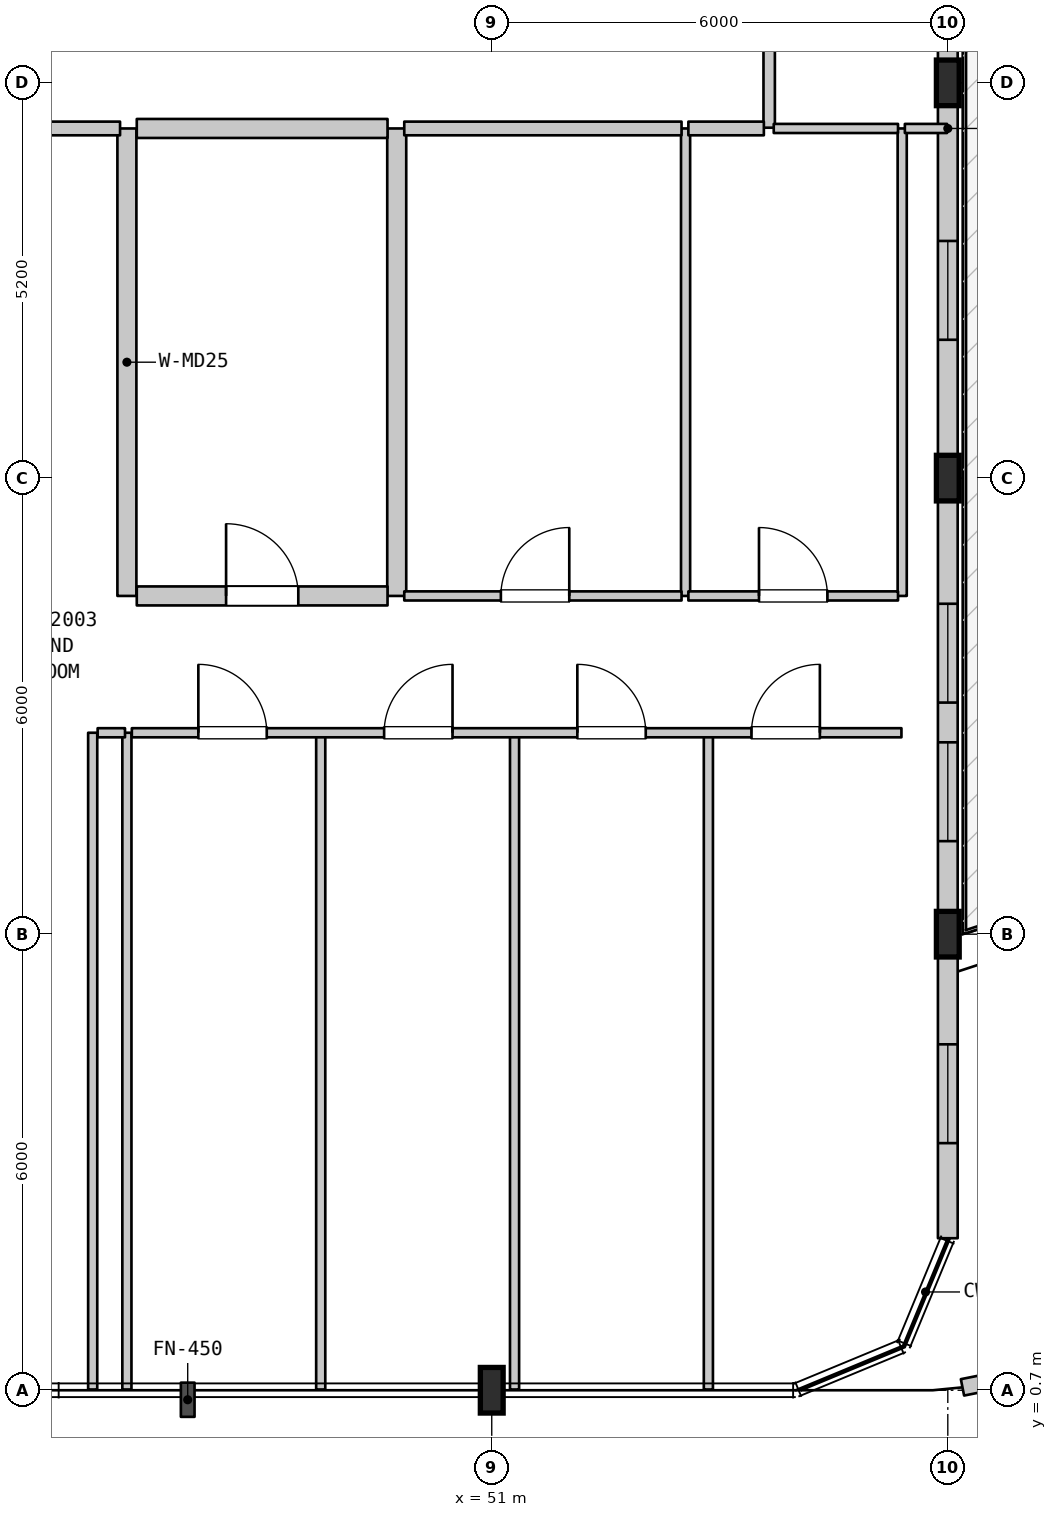
"""IFC4 building model, lengths in metres.
Left out: names, types, materials, properties, quantities, classifications, styles, units other than length and angle.
Written with IfcOpenShell. Run it as: python <this file> out.ifc"""

import sys

from ifc_helpers import new_model, si_unit, direction, frame, frame_2d, origin, origin_2d, place, context, subcontext, project, spatial, rectangle, i_section, extrude, element, fill, save


model = new_model("IFC4")
c1 = context("Model", 3, precision=1e-05, world=origin(), true_north=direction((0.0, 1.0)))
c2 = subcontext(c1, "Body", "Model", "MODEL_VIEW")
j1 = project(units=[si_unit("LENGTHUNIT", "METRE"), si_unit("PLANEANGLEUNIT", "RADIAN")], contexts=[c1])
p1 = place(None, origin())
s1 = spatial("IfcSite", under=j1, at=p1, CompositionType="ELEMENT")
p2 = place(p1, origin())
s2 = spatial("IfcBuilding", under=s1, at=p2, CompositionType="ELEMENT")
p3 = place(p2, frame((0.0, 0.0, 86.4)))
s3 = spatial("IfcBuildingStorey", under=s2, at=p3, CompositionType="ELEMENT", Elevation=86.4)
for number, where, z_axis, x_axis in (
    (1, (51.0, 0.7, 0.0), (0.0, 0.0, 1.0), (1.0, 0.0, 0.0)),
    (2, (57.0, 6.7, 0.0), (0.0, 0.0, 1.0), (1.0, 0.0, 0.0)),
    (3, (57.0, 12.7, 0.0), (0.0, 0.0, 1.0), (1.0, 0.0, 0.0)),
    (4, (57.0, 17.9, 0.0), (0.0, 0.0, 1.0), (1.0, 0.0, 0.0)),
):
    element("IfcColumn", number, at=place(p3, frame(where, z_axis=z_axis, x_axis=x_axis)), inside=s3, PredefinedType="COLUMN", context=c2, shape_type="SweptSolid", body=[
        extrude(i_section(OverallWidth=0.3, OverallDepth=0.6, WebThickness=0.015, FlangeThickness=0.03, FilletRadius=0.027, at=origin_2d()), origin(), (0.0, 0.0, 1.0), 4.5),
    ])
p4 = place(p3, frame((57.0, 27.9, 0.0), z_axis=(0.0, 0.0, 1.0), x_axis=(0.0, -1.0, 0.0)))
e5 = element("IfcWall", 5, at=p4, inside=s3, PredefinedType="STANDARD", context=c2, shape_type="SweptSolid", body=[
    extrude(rectangle(XDim=21.2, YDim=0.26, at=frame_2d((10.6, 0.0))), origin(), (0.0, 0.0, 1.0), 3.735),
])
p5 = place(p4, frame((1.511, 0.0, 0.85)))
e6 = element("IfcOpeningElement", 6, at=p5, cuts=e5, PredefinedType="OPENING", context=c2, shape_type="SweptSolid", body=[
    extrude(rectangle(XDim=1.3, YDim=1.9, at=frame_2d((0.65, 0.95))), frame((0.0, 0.14, 0.0), z_axis=(0.0, -1.0, 0.0), x_axis=(1.0, 0.0, 0.0)), (0.0, 0.0, 1.0), 0.28),
])
p6 = place(p4, frame((7.707, 0.0, 0.85)))
e7 = element("IfcOpeningElement", 7, at=p6, cuts=e5, PredefinedType="OPENING", context=c2, shape_type="SweptSolid", body=[
    extrude(rectangle(XDim=1.3, YDim=1.9, at=frame_2d((0.65, 0.95))), frame((0.0, 0.14, 0.0), z_axis=(0.0, -1.0, 0.0), x_axis=(1.0, 0.0, 0.0)), (0.0, 0.0, 1.0), 0.28),
])
p7 = place(p4, frame((12.08, 0.0, 0.85)))
e8 = element("IfcOpeningElement", 8, at=p7, cuts=e5, PredefinedType="OPENING", context=c2, shape_type="SweptSolid", body=[
    extrude(rectangle(XDim=1.3, YDim=1.9, at=frame_2d((0.65, 0.95))), frame((0.0, 0.14, 0.0), z_axis=(0.0, -1.0, 0.0), x_axis=(1.0, 0.0, 0.0)), (0.0, 0.0, 1.0), 0.28),
])
p8 = place(p4, frame((16.853, 0.0, 0.85)))
e9 = element("IfcOpeningElement", 9, at=p8, cuts=e5, PredefinedType="OPENING", context=c2, shape_type="SweptSolid", body=[
    extrude(rectangle(XDim=1.3, YDim=1.9, at=frame_2d((0.65, 0.95))), frame((0.0, 0.14, 0.0), z_axis=(0.0, -1.0, 0.0), x_axis=(1.0, 0.0, 0.0)), (0.0, 0.0, 1.0), 0.28),
])
p9 = place(p4, frame((18.676, 0.0, 0.85)))
e10 = element("IfcOpeningElement", 10, at=p9, cuts=e5, PredefinedType="OPENING", context=c2, shape_type="SweptSolid", body=[
    extrude(rectangle(XDim=1.3, YDim=1.9, at=frame_2d((0.65, 0.95))), frame((0.0, 0.14, 0.0), z_axis=(0.0, -1.0, 0.0), x_axis=(1.0, 0.0, 0.0)), (0.0, 0.0, 1.0), 0.28),
])
p10 = place(p3, frame((61.585, 1.612, 0.0), z_axis=(0.0, 0.0, 1.0), x_axis=(-0.980766859102, -0.19518290931, 0.0)))
e11 = element("IfcWall", 11, at=p10, inside=s3, PredefinedType="PARAPET", context=c2, shape_type="SweptSolid", body=[
    extrude(rectangle(XDim=4.478, YDim=0.22, at=frame_2d((2.239, 0.0))), origin(), (0.0, 0.0, 1.0), 0.55),
])
for number, where, z_axis, x_axis in (
    (12, (45.75, 0.71, 0.0), (0.0, 0.0, 1.0), (0.0, 1.0, 0.0)),
    (13, (46.2, 0.71, 0.0), (0.0, 0.0, 1.0), (0.0, 1.0, 0.0)),
):
    element("IfcWall", number, at=place(p3, frame(where, z_axis=z_axis, x_axis=x_axis)), inside=s3, PredefinedType="PARTITIONING", context=c2, shape_type="SweptSolid", body=[
        extrude(rectangle(XDim=8.64, YDim=0.12, at=frame_2d((4.32, 0.0))), origin(), (0.0, 0.0, 1.0), 4.185),
    ])
p11 = place(p3, frame((46.2, 11.15, 0.0), z_axis=(0.0, 0.0, 1.0), x_axis=(0.0, 1.0, 0.0)))
e14 = element("IfcWall", 14, at=p11, inside=s3, PredefinedType="STANDARD", context=c2, shape_type="SweptSolid", body=[
    extrude(rectangle(XDim=6.15, YDim=0.25, at=frame_2d((3.075, 0.0))), origin(), (0.0, 0.0, 1.0), 4.185),
])
p12 = place(p3, frame((48.75, 0.71, 0.0), z_axis=(0.0, 0.0, 1.0), x_axis=(0.0, 1.0, 0.0)))
e15 = element("IfcWall", 15, at=p12, inside=s3, PredefinedType="PARTITIONING", context=c2, shape_type="SweptSolid", body=[
    extrude(rectangle(XDim=8.64, YDim=0.12, at=frame_2d((4.32, 0.0))), origin(), (0.0, 0.0, 1.0), 4.185),
])
p13 = place(p3, frame((49.75, 11.15, 0.0), z_axis=(0.0, 0.0, 1.0), x_axis=(0.0, 1.0, 0.0)))
e16 = element("IfcWall", 16, at=p13, inside=s3, PredefinedType="STANDARD", context=c2, shape_type="SweptSolid", body=[
    extrude(rectangle(XDim=6.15, YDim=0.25, at=frame_2d((3.075, 0.0))), origin(), (0.0, 0.0, 1.0), 4.185),
])
p14 = place(p3, frame((51.3, 0.71, 0.0), z_axis=(0.0, 0.0, 1.0), x_axis=(0.0, 1.0, 0.0)))
e17 = element("IfcWall", 17, at=p14, inside=s3, PredefinedType="PARTITIONING", context=c2, shape_type="SweptSolid", body=[
    extrude(rectangle(XDim=8.64, YDim=0.12, at=frame_2d((4.32, 0.0))), origin(), (0.0, 0.0, 1.0), 4.185),
])
p15 = place(p3, frame((53.55, 11.15, 0.0), z_axis=(0.0, 0.0, 1.0), x_axis=(0.0, 1.0, 0.0)))
e18 = element("IfcWall", 18, at=p15, inside=s3, PredefinedType="PARTITIONING", context=c2, shape_type="SweptSolid", body=[
    extrude(rectangle(XDim=6.15, YDim=0.12, at=frame_2d((3.075, 0.0))), origin(), (0.0, 0.0, 1.0), 4.185),
])
p16 = place(p3, frame((53.85, 0.71, 0.0), z_axis=(0.0, 0.0, 1.0), x_axis=(0.0, 1.0, 0.0)))
e19 = element("IfcWall", 19, at=p16, inside=s3, PredefinedType="PARTITIONING", context=c2, shape_type="SweptSolid", body=[
    extrude(rectangle(XDim=8.64, YDim=0.12, at=frame_2d((4.32, 0.0))), origin(), (0.0, 0.0, 1.0), 4.185),
])
p17 = place(p3, frame((54.65, 17.31, 0.0), z_axis=(0.0, 0.0, 1.0), x_axis=(0.0, 1.0, 0.0)))
e20 = element("IfcWall", 20, at=p17, inside=s3, PredefinedType="STANDARD", context=c2, shape_type="SweptSolid", body=[
    extrude(rectangle(XDim=2.19, YDim=0.15, at=frame_2d((1.095, 0.0))), origin(), (0.0, 0.0, 1.0), 4.185),
])
p18 = place(p3, frame((56.4, 11.15, 0.0), z_axis=(0.0, 0.0, 1.0), x_axis=(0.0, 1.0, 0.0)))
e21 = element("IfcWall", 21, at=p18, inside=s3, PredefinedType="PARTITIONING", context=c2, shape_type="SweptSolid", body=[
    extrude(rectangle(XDim=6.15, YDim=0.12, at=frame_2d((3.075, 0.0))), origin(), (0.0, 0.0, 1.0), 4.185),
])
p19 = place(p3, frame((45.815, 9.35, 0.0), z_axis=(0.0, 0.0, 1.0), x_axis=(1.0, 0.0, 0.0)))
e22 = element("IfcWall", 22, at=p19, inside=s3, PredefinedType="PARTITIONING", context=c2, shape_type="SweptSolid", body=[
    extrude(rectangle(XDim=0.36, YDim=0.12, at=frame_2d((0.18, 0.0))), origin(), (0.0, 0.0, 1.0), 4.185),
])
p20 = place(p3, frame((46.265, 9.35, 0.0), z_axis=(0.0, 0.0, 1.0), x_axis=(1.0, 0.0, 0.0)))
e23 = element("IfcWall", 23, at=p20, inside=s3, PredefinedType="PARTITIONING", context=c2, shape_type="SweptSolid", body=[
    extrude(rectangle(XDim=10.125, YDim=0.12, at=frame_2d((5.062, 0.0))), origin(), (0.0, 0.0, 1.0), 4.185),
])
p21 = place(p20, frame((0.875, 0.0, 0.0)))
e24 = element("IfcOpeningElement", 24, at=p21, cuts=e23, PredefinedType="OPENING", context=c2, shape_type="SweptSolid", body=[
    extrude(rectangle(XDim=0.9, YDim=2.15, at=frame_2d((0.45, 1.075))), frame((0.0, 0.07, 0.0), z_axis=(0.0, -1.0, 0.0), x_axis=(1.0, 0.0, 0.0)), (0.0, 0.0, 1.0), 0.14),
])
p22 = place(p20, frame((3.319, 0.0, 0.0)))
e25 = element("IfcOpeningElement", 25, at=p22, cuts=e23, PredefinedType="OPENING", context=c2, shape_type="SweptSolid", body=[
    extrude(rectangle(XDim=0.9, YDim=2.15, at=frame_2d((0.45, 1.075))), frame((0.0, 0.07, 0.0), z_axis=(0.0, -1.0, 0.0), x_axis=(1.0, 0.0, 0.0)), (0.0, 0.0, 1.0), 0.14),
])
p23 = place(p20, frame((5.861, 0.0, 0.0)))
e26 = element("IfcOpeningElement", 26, at=p23, cuts=e23, PredefinedType="OPENING", context=c2, shape_type="SweptSolid", body=[
    extrude(rectangle(XDim=0.9, YDim=2.15, at=frame_2d((0.45, 1.075))), frame((0.0, 0.07, 0.0), z_axis=(0.0, -1.0, 0.0), x_axis=(1.0, 0.0, 0.0)), (0.0, 0.0, 1.0), 0.14),
])
p24 = place(p20, frame((8.152, 0.0, 0.0)))
e27 = element("IfcOpeningElement", 27, at=p24, cuts=e23, PredefinedType="OPENING", context=c2, shape_type="SweptSolid", body=[
    extrude(rectangle(XDim=0.9, YDim=2.15, at=frame_2d((0.45, 1.075))), frame((0.0, 0.07, 0.0), z_axis=(0.0, -1.0, 0.0), x_axis=(1.0, 0.0, 0.0)), (0.0, 0.0, 1.0), 0.14),
])
p25 = place(p3, frame((46.33, 11.15, 0.0), z_axis=(0.0, 0.0, 1.0), x_axis=(1.0, 0.0, 0.0)))
e28 = element("IfcWall", 28, at=p25, inside=s3, PredefinedType="STANDARD", context=c2, shape_type="SweptSolid", body=[
    extrude(rectangle(XDim=3.299, YDim=0.25, at=frame_2d((1.649, 0.0))), origin(), (0.0, 0.0, 1.0), 4.185),
])
p26 = place(p25, frame((1.175, 0.0, 0.0)))
e29 = element("IfcOpeningElement", 29, at=p26, cuts=e28, PredefinedType="OPENING", context=c2, shape_type="SweptSolid", body=[
    extrude(rectangle(XDim=0.95, YDim=2.15, at=frame_2d((0.475, 1.075))), frame((0.0, 0.135, 0.0), z_axis=(0.0, -1.0, 0.0), x_axis=(1.0, 0.0, 0.0)), (0.0, 0.0, 1.0), 0.27),
])
p27 = place(p3, frame((49.849, 11.15, 0.0), z_axis=(0.0, 0.0, 1.0), x_axis=(1.0, 0.0, 0.0)))
e30 = element("IfcWall", 30, at=p27, inside=s3, PredefinedType="PARTITIONING", context=c2, shape_type="SweptSolid", body=[
    extrude(rectangle(XDim=3.648, YDim=0.12, at=frame_2d((1.824, 0.0))), origin(), (0.0, 0.0, 1.0), 4.185),
])
p28 = place(p27, frame((1.271, 0.0, 0.0)))
e31 = element("IfcOpeningElement", 31, at=p28, cuts=e30, PredefinedType="OPENING", context=c2, shape_type="SweptSolid", body=[
    extrude(rectangle(XDim=0.9, YDim=2.15, at=frame_2d((0.45, 1.075))), frame((0.0, 0.07, 0.0), z_axis=(0.0, -1.0, 0.0), x_axis=(1.0, 0.0, 0.0)), (0.0, 0.0, 1.0), 0.14),
])
p29 = place(p3, frame((53.587, 11.15, 0.0), z_axis=(0.0, 0.0, 1.0), x_axis=(1.0, 0.0, 0.0)))
e32 = element("IfcWall", 32, at=p29, inside=s3, PredefinedType="PARTITIONING", context=c2, shape_type="SweptSolid", body=[
    extrude(rectangle(XDim=2.758, YDim=0.12, at=frame_2d((1.379, 0.0))), origin(), (0.0, 0.0, 1.0), 4.185),
])
p30 = place(p29, frame((0.929, 0.0, 0.0)))
e33 = element("IfcOpeningElement", 33, at=p30, cuts=e32, PredefinedType="OPENING", context=c2, shape_type="SweptSolid", body=[
    extrude(rectangle(XDim=0.9, YDim=2.1, at=frame_2d((0.45, 1.05))), frame((0.0, 0.07, 0.0), z_axis=(0.0, -1.0, 0.0), x_axis=(1.0, 0.0, 0.0)), (0.0, 0.0, 1.0), 0.14),
])
p31 = place(p3, frame((40.565, 17.3, 0.0), z_axis=(0.0, 0.0, 1.0), x_axis=(1.0, 0.0, 0.0)))
e34 = element("IfcWall", 34, at=p31, inside=s3, PredefinedType="STANDARD", context=c2, shape_type="SweptSolid", body=[
    extrude(rectangle(XDim=5.545, YDim=0.18, at=frame_2d((2.772, 0.0))), origin(), (0.0, 0.0, 1.0), 4.185),
])
p32 = place(p31, frame((2.435, 0.0, 0.0)))
e35 = element("IfcOpeningElement", 35, at=p32, cuts=e34, PredefinedType="OPENING", context=c2, shape_type="SweptSolid", body=[
    extrude(rectangle(XDim=1.0, YDim=2.15, at=frame_2d((0.5, 1.075))), frame((0.0, 0.1, 0.0), z_axis=(0.0, -1.0, 0.0), x_axis=(1.0, 0.0, 0.0)), (0.0, 0.0, 1.0), 0.2),
])
p33 = place(p3, frame((46.33, 17.3, 0.0), z_axis=(0.0, 0.0, 1.0), x_axis=(1.0, 0.0, 0.0)))
e36 = element("IfcWall", 36, at=p33, inside=s3, PredefinedType="STANDARD", context=c2, shape_type="SweptSolid", body=[
    extrude(rectangle(XDim=3.299, YDim=0.25, at=frame_2d((1.649, 0.0))), origin(), (0.0, 0.0, 1.0), 4.185),
])
p34 = place(p3, frame((49.849, 17.3, 0.0), z_axis=(0.0, 0.0, 1.0), x_axis=(1.0, 0.0, 0.0)))
e37 = element("IfcWall", 37, at=p34, inside=s3, PredefinedType="STANDARD", context=c2, shape_type="SweptSolid", body=[
    extrude(rectangle(XDim=3.648, YDim=0.18, at=frame_2d((1.824, 0.0))), origin(), (0.0, 0.0, 1.0), 4.185),
])
p35 = place(p3, frame((53.587, 17.3, 0.0), z_axis=(0.0, 0.0, 1.0), x_axis=(1.0, 0.0, 0.0)))
e38 = element("IfcWall", 38, at=p35, inside=s3, PredefinedType="STANDARD", context=c2, shape_type="SweptSolid", body=[
    extrude(rectangle(XDim=0.993, YDim=0.18, at=frame_2d((0.497, 0.0))), origin(), (0.0, 0.0, 1.0), 4.185),
])
p36 = place(p3, frame((54.71, 17.3, 0.0), z_axis=(0.0, 0.0, 1.0), x_axis=(1.0, 0.0, 0.0)))
e39 = element("IfcWall", 39, at=p36, inside=s3, PredefinedType="PARTITIONING", context=c2, shape_type="SweptSolid", body=[
    extrude(rectangle(XDim=1.635, YDim=0.12, at=frame_2d((0.817, 0.0))), origin(), (0.0, 0.0, 1.0), 4.185),
])
p37 = place(p3, frame((56.435, 17.3, 0.0), z_axis=(0.0, 0.0, 1.0), x_axis=(1.0, 0.0, 0.0)))
e40 = element("IfcWall", 40, at=p37, inside=s3, PredefinedType="PARTITIONING", context=c2, shape_type="SweptSolid", body=[
    extrude(rectangle(XDim=0.555, YDim=0.12, at=frame_2d((0.277, 0.0))), origin(), (0.0, 0.0, 1.0), 4.185),
])
p38 = place(p3, frame((57.0, 6.7, 0.0), z_axis=(0.0, 0.0, 1.0), x_axis=(0.0, -1.0, 0.0)))
e41 = element("IfcWall", 41, at=p38, inside=s3, PredefinedType="STANDARD", context=c2, shape_type="SweptSolid", body=[
    extrude(rectangle(XDim=4.0, YDim=0.26, at=frame_2d((2.0, 0.0))), origin(), (0.0, 0.0, 1.0), 4.185),
])
p39 = place(p38, frame((1.449, 0.0, 0.85)))
e42 = element("IfcOpeningElement", 42, at=p39, cuts=e41, PredefinedType="OPENING", context=c2, shape_type="SweptSolid", body=[
    extrude(rectangle(XDim=1.3, YDim=1.9, at=frame_2d((0.65, 0.95))), frame((0.0, 0.14, 0.0), z_axis=(0.0, -1.0, 0.0), x_axis=(1.0, 0.0, 0.0)), (0.0, 0.0, 1.0), 0.28),
])
p40 = place(p7, origin())
e43 = element("IfcWindow", 43, at=p40, inside=s3, PartitioningType="SINGLE_PANEL", PredefinedType="WINDOW", context=c2, shape_type="SweptSolid", body=[
    extrude(rectangle(XDim=1.3, YDim=1.9, at=frame_2d((0.65, 0.95))), frame((0.0, 0.03, 0.0), z_axis=(0.0, -1.0, 0.0), x_axis=(1.0, 0.0, 0.0)), (0.0, 0.0, 1.0), 0.06),
])
fill(e8, e43)
p41 = place(p8, origin())
e44 = element("IfcWindow", 44, at=p41, inside=s3, PartitioningType="SINGLE_PANEL", PredefinedType="WINDOW", context=c2, shape_type="SweptSolid", body=[
    extrude(rectangle(XDim=1.3, YDim=1.9, at=frame_2d((0.65, 0.95))), frame((0.0, 0.03, 0.0), z_axis=(0.0, -1.0, 0.0), x_axis=(1.0, 0.0, 0.0)), (0.0, 0.0, 1.0), 0.06),
])
fill(e9, e44)
p42 = place(p9, origin())
e45 = element("IfcWindow", 45, at=p42, inside=s3, PartitioningType="SINGLE_PANEL", PredefinedType="WINDOW", context=c2, shape_type="SweptSolid", body=[
    extrude(rectangle(XDim=1.3, YDim=1.9, at=frame_2d((0.65, 0.95))), frame((0.0, 0.03, 0.0), z_axis=(0.0, -1.0, 0.0), x_axis=(1.0, 0.0, 0.0)), (0.0, 0.0, 1.0), 0.06),
])
fill(e10, e45)
p43 = place(p39, origin())
e46 = element("IfcWindow", 46, at=p43, inside=s3, PartitioningType="SINGLE_PANEL", PredefinedType="WINDOW", context=c2, shape_type="SweptSolid", body=[
    extrude(rectangle(XDim=1.3, YDim=1.9, at=frame_2d((0.65, 0.95))), frame((0.0, 0.03, 0.0), z_axis=(0.0, -1.0, 0.0), x_axis=(1.0, 0.0, 0.0)), (0.0, 0.0, 1.0), 0.06),
])
fill(e42, e46)
p44 = place(p21, origin())
e47 = element("IfcDoor", 47, at=p44, inside=s3, OperationType="SINGLE_SWING_LEFT", PredefinedType="DOOR", context=c2, shape_type="SweptSolid", body=[
    extrude(rectangle(XDim=0.9, YDim=2.15, at=frame_2d((0.45, 1.075))), frame((0.0, 0.025, 0.0), z_axis=(0.0, -1.0, 0.0), x_axis=(1.0, 0.0, 0.0)), (0.0, 0.0, 1.0), 0.05),
])
fill(e24, e47)
p45 = place(p22, origin())
e48 = element("IfcDoor", 48, at=p45, inside=s3, OperationType="SINGLE_SWING_RIGHT", PredefinedType="DOOR", context=c2, shape_type="SweptSolid", body=[
    extrude(rectangle(XDim=0.9, YDim=2.15, at=frame_2d((0.45, 1.075))), frame((0.0, 0.025, 0.0), z_axis=(0.0, -1.0, 0.0), x_axis=(1.0, 0.0, 0.0)), (0.0, 0.0, 1.0), 0.05),
])
fill(e25, e48)
p46 = place(p23, origin())
e49 = element("IfcDoor", 49, at=p46, inside=s3, OperationType="SINGLE_SWING_LEFT", PredefinedType="DOOR", context=c2, shape_type="SweptSolid", body=[
    extrude(rectangle(XDim=0.9, YDim=2.15, at=frame_2d((0.45, 1.075))), frame((0.0, 0.025, 0.0), z_axis=(0.0, -1.0, 0.0), x_axis=(1.0, 0.0, 0.0)), (0.0, 0.0, 1.0), 0.05),
])
fill(e26, e49)
p47 = place(p24, origin())
e50 = element("IfcDoor", 50, at=p47, inside=s3, OperationType="SINGLE_SWING_RIGHT", PredefinedType="DOOR", context=c2, shape_type="SweptSolid", body=[
    extrude(rectangle(XDim=0.9, YDim=2.15, at=frame_2d((0.45, 1.075))), frame((0.0, 0.025, 0.0), z_axis=(0.0, -1.0, 0.0), x_axis=(1.0, 0.0, 0.0)), (0.0, 0.0, 1.0), 0.05),
])
fill(e27, e50)
p48 = place(p26, origin())
e51 = element("IfcDoor", 51, at=p48, inside=s3, OperationType="SINGLE_SWING_LEFT", PredefinedType="DOOR", context=c2, shape_type="SweptSolid", body=[
    extrude(rectangle(XDim=0.95, YDim=2.15, at=frame_2d((0.475, 1.075))), frame((0.0, 0.025, 0.0), z_axis=(0.0, -1.0, 0.0), x_axis=(1.0, 0.0, 0.0)), (0.0, 0.0, 1.0), 0.05),
])
fill(e29, e51)
p49 = place(p28, origin())
e52 = element("IfcDoor", 52, at=p49, inside=s3, OperationType="SINGLE_SWING_RIGHT", PredefinedType="DOOR", context=c2, shape_type="SweptSolid", body=[
    extrude(rectangle(XDim=0.9, YDim=2.15, at=frame_2d((0.45, 1.075))), frame((0.0, 0.025, 0.0), z_axis=(0.0, -1.0, 0.0), x_axis=(1.0, 0.0, 0.0)), (0.0, 0.0, 1.0), 0.05),
])
fill(e31, e52)
p50 = place(p30, origin())
e53 = element("IfcDoor", 53, at=p50, inside=s3, OperationType="SINGLE_SWING_LEFT", PredefinedType="DOOR", context=c2, shape_type="SweptSolid", body=[
    extrude(rectangle(XDim=0.9, YDim=2.1, at=frame_2d((0.45, 1.05))), frame((0.0, 0.025, 0.0), z_axis=(0.0, -1.0, 0.0), x_axis=(1.0, 0.0, 0.0)), (0.0, 0.0, 1.0), 0.05),
])
fill(e33, e53)
save(model, sys.argv[1])
